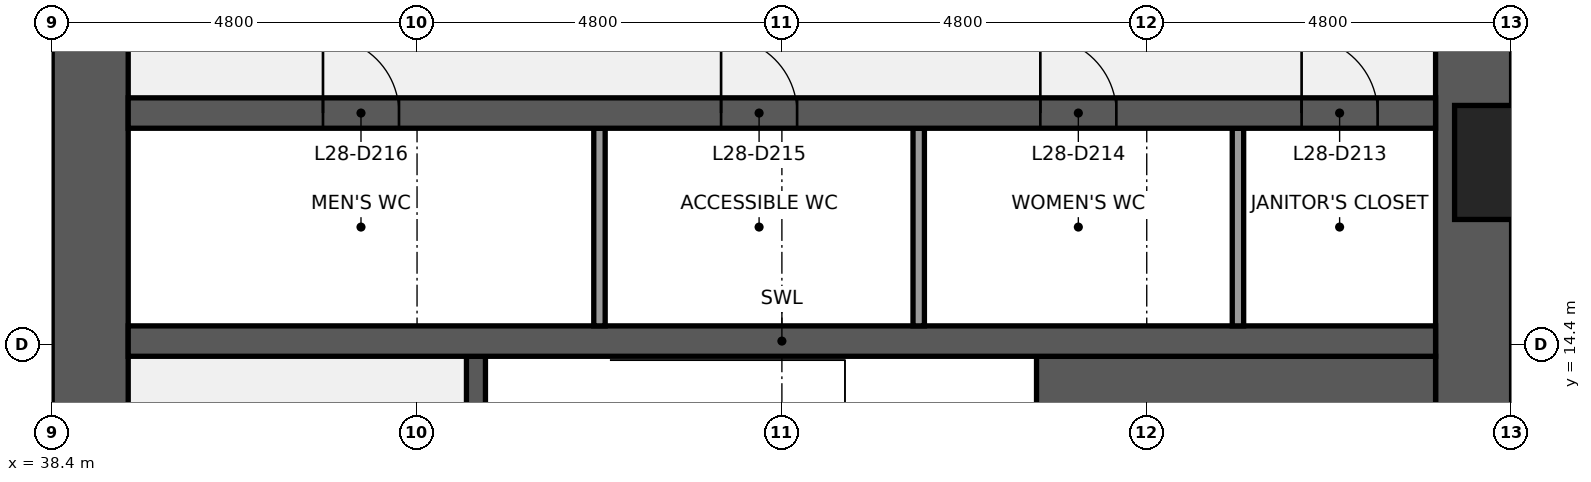
"""IFC4 building model, lengths in metres.
Left out: names, types, materials, properties, quantities, classifications, styles, units other than length and angle.
Written with IfcOpenShell. Run it as: python <this file> out.ifc"""

import sys

from ifc_helpers import new_model, si_unit, direction, frame, frame_2d, origin, place, context, subcontext, project, spatial, rectangle, extrude, element, fill, save


model = new_model("IFC4")
c1 = context("Model", 3, precision=1e-05, world=origin(), true_north=direction((0.0, 1.0)))
c2 = subcontext(c1, "Body", "Model", "MODEL_VIEW")
j1 = project(units=[si_unit("LENGTHUNIT", "METRE"), si_unit("PLANEANGLEUNIT", "RADIAN")], contexts=[c1])
p1 = place(None, origin())
s1 = spatial("IfcSite", under=j1, at=p1, CompositionType="ELEMENT")
p2 = place(p1, origin())
s2 = spatial("IfcBuilding", under=s1, at=p2, CompositionType="ELEMENT")
p3 = place(p2, frame((0.0, 0.0, 132.1)))
s3 = spatial("IfcBuildingStorey", under=s2, at=p3, CompositionType="ELEMENT", Elevation=132.1)
p4 = place(p3, frame((57.1, 38.4, 0.0), z_axis=(0.0, 0.0, 1.0), x_axis=(0.0, -1.0, 0.0)))
e1 = element("IfcWall", 1, at=p4, inside=s3, PredefinedType="SHEAR", context=c2, shape_type="SweptSolid", body=[
    extrude(rectangle(XDim=28.8, YDim=1.0, at=frame_2d((14.4, 0.0))), origin(), (0.0, 0.0, 1.0), 3.84),
])
p5 = place(p4, frame((18.45, 0.0, 0.9)))
e2 = element("IfcOpeningElement", 2, at=p5, cuts=e1, PredefinedType="OPENING", context=c2, shape_type="SweptSolid", body=[
    extrude(rectangle(XDim=1.5, YDim=1.5, at=frame_2d((0.75, 0.75))), frame((0.0, 0.51, 0.0), z_axis=(0.0, -1.0, 0.0), x_axis=(1.0, 0.0, 0.0)), (0.0, 0.0, 1.0), 1.02),
])
p6 = place(p4, frame((8.85, 0.0, 0.9)))
e3 = element("IfcOpeningElement", 3, at=p6, cuts=e1, PredefinedType="OPENING", context=c2, shape_type="SweptSolid", body=[
    extrude(rectangle(XDim=1.5, YDim=1.5, at=frame_2d((0.75, 0.75))), frame((0.0, 0.51, 0.0), z_axis=(0.0, -1.0, 0.0), x_axis=(1.0, 0.0, 0.0)), (0.0, 0.0, 1.0), 1.02),
])
p7 = place(p3, frame((38.9, 9.6, 0.0), z_axis=(0.0, 0.0, 1.0), x_axis=(0.0, 1.0, 0.0)))
e4 = element("IfcWall", 4, at=p7, inside=s3, PredefinedType="SHEAR", context=c2, shape_type="SweptSolid", body=[
    extrude(rectangle(XDim=28.8, YDim=1.0, at=frame_2d((14.4, 0.0))), origin(), (0.0, 0.0, 1.0), 3.84),
])
p8 = place(p7, frame((8.7, 0.0, 0.0)))
e5 = element("IfcOpeningElement", 5, at=p8, cuts=e4, PredefinedType="OPENING", context=c2, shape_type="SweptSolid", body=[
    extrude(rectangle(XDim=1.8, YDim=2.1, at=frame_2d((0.9, 1.05))), frame((0.0, 0.51, 0.0), z_axis=(0.0, -1.0, 0.0), x_axis=(1.0, 0.0, 0.0)), (0.0, 0.0, 1.0), 1.02),
])
p9 = place(p7, frame((18.3, 0.0, 0.0)))
e6 = element("IfcOpeningElement", 6, at=p9, cuts=e4, PredefinedType="OPENING", context=c2, shape_type="SweptSolid", body=[
    extrude(rectangle(XDim=1.8, YDim=2.1, at=frame_2d((0.9, 1.05))), frame((0.0, 0.51, 0.0), z_axis=(0.0, -1.0, 0.0), x_axis=(1.0, 0.0, 0.0)), (0.0, 0.0, 1.0), 1.02),
])
p10 = place(p3, frame((51.35, 12.425, 0.0), z_axis=(0.0, 0.0, 1.0), x_axis=(1.0, 0.0, 0.0)))
e7 = element("IfcWall", 7, at=p10, inside=s3, PredefinedType="SHEAR", context=c2, shape_type="SweptSolid", body=[
    extrude(rectangle(XDim=5.25, YDim=3.65, at=frame_2d((2.625, 0.0))), origin(), (0.0, 0.0, 1.0), 3.84),
])
p11 = place(p3, frame((43.975, 10.8, 0.0), z_axis=(0.0, 0.0, 1.0), x_axis=(0.0, 1.0, 0.0)))
e8 = element("IfcWall", 8, at=p11, inside=s3, PredefinedType="SHEAR", context=c2, shape_type="SweptSolid", body=[
    extrude(rectangle(XDim=3.45, YDim=0.25, at=frame_2d((1.725, 0.0))), origin(), (0.0, 0.0, 1.0), 3.84),
])
p12 = place(p11, frame((1.175, 0.0, 0.0)))
e9 = element("IfcOpeningElement", 9, at=p12, cuts=e8, PredefinedType="OPENING", context=c2, shape_type="SweptSolid", body=[
    extrude(rectangle(XDim=1.1, YDim=2.1, at=frame_2d((0.55, 1.05))), frame((0.0, 0.135, 0.0), z_axis=(0.0, -1.0, 0.0), x_axis=(1.0, 0.0, 0.0)), (0.0, 0.0, 1.0), 0.27),
])
p13 = place(p3, frame((39.4, 14.45, 0.0), z_axis=(0.0, 0.0, 1.0), x_axis=(1.0, 0.0, 0.0)))
e10 = element("IfcWall", 10, at=p13, inside=s3, PredefinedType="SHEAR", context=c2, shape_type="SweptSolid", body=[
    extrude(rectangle(XDim=17.2, YDim=0.4, at=frame_2d((8.6, 0.0))), origin(), (0.0, 0.0, 1.0), 3.84),
])
for number, where, z_axis, x_axis in (
    (11, (54.0, 14.65, 0.0), (0.0, 0.0, 1.0), (0.0, 1.0, 0.0)),
    (12, (49.8, 14.65, 0.0), (0.0, 0.0, 1.0), (0.0, 1.0, 0.0)),
    (13, (45.6, 14.65, 0.0), (0.0, 0.0, 1.0), (0.0, 1.0, 0.0)),
):
    element("IfcWall", number, at=place(p3, frame(where, z_axis=z_axis, x_axis=x_axis)), inside=s3, PredefinedType="PARTITIONING", context=c2, shape_type="SweptSolid", body=[
        extrude(rectangle(XDim=2.6, YDim=0.15, at=frame_2d((1.3, 0.0))), origin(), (0.0, 0.0, 1.0), 3.84),
    ])
p14 = place(p3, frame((39.4, 17.45, 0.0), z_axis=(0.0, 0.0, 1.0), x_axis=(1.0, 0.0, 0.0)))
e14 = element("IfcWall", 14, at=p14, inside=s3, PredefinedType="SHEAR", context=c2, shape_type="SweptSolid", body=[
    extrude(rectangle(XDim=17.2, YDim=0.4, at=frame_2d((8.6, 0.0))), origin(), (0.0, 0.0, 1.0), 3.84),
])
p15 = place(p14, frame((15.438, 0.0, 0.0)))
e15 = element("IfcOpeningElement", 15, at=p15, cuts=e14, PredefinedType="OPENING", context=c2, shape_type="SweptSolid", body=[
    extrude(rectangle(XDim=1.0, YDim=2.1, at=frame_2d((0.5, 1.05))), frame((0.0, 0.21, 0.0), z_axis=(0.0, -1.0, 0.0), x_axis=(1.0, 0.0, 0.0)), (0.0, 0.0, 1.0), 0.42),
])
p16 = place(p14, frame((12.0, 0.0, 0.0)))
e16 = element("IfcOpeningElement", 16, at=p16, cuts=e14, PredefinedType="OPENING", context=c2, shape_type="SweptSolid", body=[
    extrude(rectangle(XDim=1.0, YDim=2.1, at=frame_2d((0.5, 1.05))), frame((0.0, 0.21, 0.0), z_axis=(0.0, -1.0, 0.0), x_axis=(1.0, 0.0, 0.0)), (0.0, 0.0, 1.0), 0.42),
])
p17 = place(p14, frame((7.8, 0.0, 0.0)))
e17 = element("IfcOpeningElement", 17, at=p17, cuts=e14, PredefinedType="OPENING", context=c2, shape_type="SweptSolid", body=[
    extrude(rectangle(XDim=1.0, YDim=2.1, at=frame_2d((0.5, 1.05))), frame((0.0, 0.21, 0.0), z_axis=(0.0, -1.0, 0.0), x_axis=(1.0, 0.0, 0.0)), (0.0, 0.0, 1.0), 0.42),
])
p18 = place(p14, frame((2.562, 0.0, 0.0)))
e18 = element("IfcOpeningElement", 18, at=p18, cuts=e14, PredefinedType="OPENING", context=c2, shape_type="SweptSolid", body=[
    extrude(rectangle(XDim=1.0, YDim=2.1, at=frame_2d((0.5, 1.05))), frame((0.0, 0.21, 0.0), z_axis=(0.0, -1.0, 0.0), x_axis=(1.0, 0.0, 0.0)), (0.0, 0.0, 1.0), 0.42),
])
p19 = place(p15, origin())
e19 = element("IfcDoor", 19, at=p19, inside=s3, OperationType="SINGLE_SWING_LEFT", PredefinedType="DOOR", context=c2, shape_type="SweptSolid", body=[
    extrude(rectangle(XDim=1.0, YDim=2.1, at=frame_2d((0.5, 1.05))), frame((0.0, 0.025, 0.0), z_axis=(0.0, -1.0, 0.0), x_axis=(1.0, 0.0, 0.0)), (0.0, 0.0, 1.0), 0.05),
])
fill(e15, e19)
p20 = place(p16, origin())
e20 = element("IfcDoor", 20, at=p20, inside=s3, OperationType="SINGLE_SWING_LEFT", PredefinedType="DOOR", context=c2, shape_type="SweptSolid", body=[
    extrude(rectangle(XDim=1.0, YDim=2.1, at=frame_2d((0.5, 1.05))), frame((0.0, 0.025, 0.0), z_axis=(0.0, -1.0, 0.0), x_axis=(1.0, 0.0, 0.0)), (0.0, 0.0, 1.0), 0.05),
])
fill(e16, e20)
p21 = place(p17, origin())
e21 = element("IfcDoor", 21, at=p21, inside=s3, OperationType="SINGLE_SWING_LEFT", PredefinedType="DOOR", context=c2, shape_type="SweptSolid", body=[
    extrude(rectangle(XDim=1.0, YDim=2.1, at=frame_2d((0.5, 1.05))), frame((0.0, 0.025, 0.0), z_axis=(0.0, -1.0, 0.0), x_axis=(1.0, 0.0, 0.0)), (0.0, 0.0, 1.0), 0.05),
])
fill(e17, e21)
p22 = place(p18, origin())
e22 = element("IfcDoor", 22, at=p22, inside=s3, OperationType="SINGLE_SWING_LEFT", PredefinedType="DOOR", context=c2, shape_type="SweptSolid", body=[
    extrude(rectangle(XDim=1.0, YDim=2.1, at=frame_2d((0.5, 1.05))), frame((0.0, 0.025, 0.0), z_axis=(0.0, -1.0, 0.0), x_axis=(1.0, 0.0, 0.0)), (0.0, 0.0, 1.0), 0.05),
])
fill(e18, e22)
save(model, sys.argv[1])
